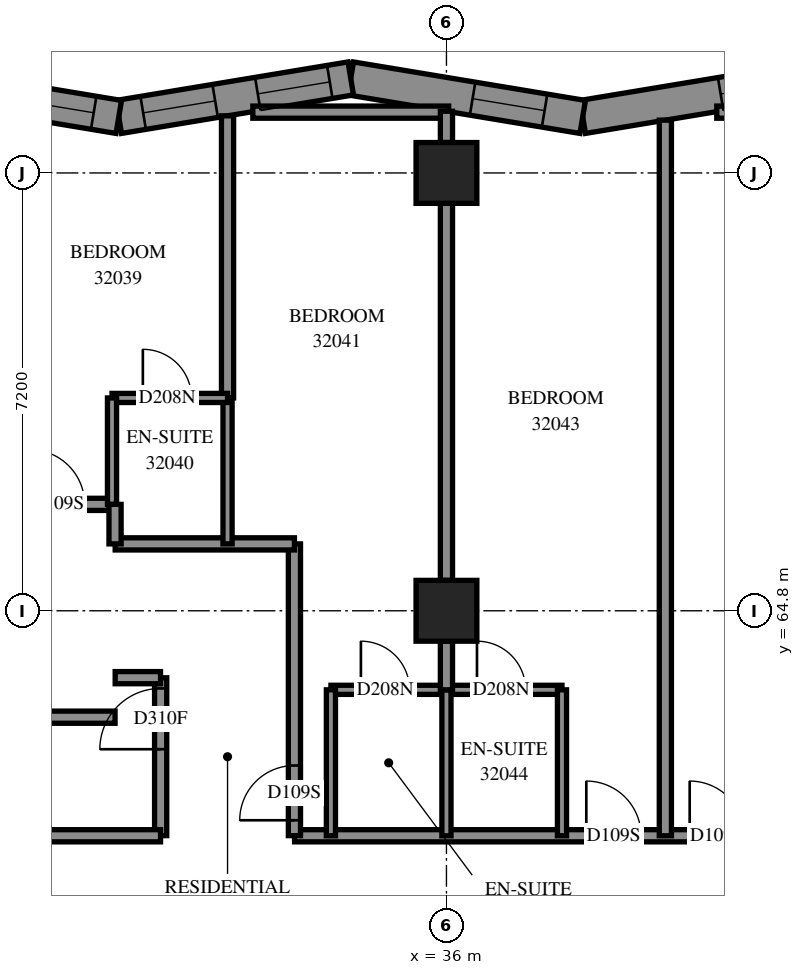
"""IFC4 building model, lengths in metres.
Left out: names, types, materials, properties, quantities, classifications, styles, units other than length and angle.
Written with IfcOpenShell. Run it as: python <this file> out.ifc"""

import sys

from ifc_helpers import new_model, si_unit, direction, frame, frame_2d, origin, origin_2d, place, context, subcontext, project, spatial, polyline, rectangle, outline, extrude, element, fill, save


model = new_model("IFC4")
c1 = context("Model", 3, precision=1e-05, world=origin(), true_north=direction((0.0, 1.0)))
c2 = subcontext(c1, "Body", "Model", "MODEL_VIEW")
j1 = project(units=[si_unit("LENGTHUNIT", "METRE"), si_unit("PLANEANGLEUNIT", "RADIAN")], contexts=[c1])
p1 = place(None, origin())
s1 = spatial("IfcSite", under=j1, at=p1, CompositionType="ELEMENT")
p2 = place(p1, origin())
s2 = spatial("IfcBuilding", under=s1, at=p2, CompositionType="ELEMENT")
p3 = place(p2, frame((0.0, 0.0, 118.6)))
s3 = spatial("IfcBuildingStorey", under=s2, at=p3, CompositionType="ELEMENT", Elevation=118.6)
for number, where, z_axis, x_axis in (
    (1, (36.0, 64.8, 0.0), (0.0, 0.0, 1.0), (1.0, 0.0, 0.0)),
    (2, (36.0, 72.0, 0.0), (0.0, 0.0, 1.0), (1.0, 0.0, 0.0)),
):
    element("IfcColumn", number, at=place(p3, frame(where, z_axis=z_axis, x_axis=x_axis)), inside=s3, PredefinedType="COLUMN", context=c2, shape_type="SweptSolid", body=[
        extrude(rectangle(XDim=1.0, YDim=1.0, at=origin_2d()), origin(), (0.0, 0.0, 1.0), 3.1),
    ])
p4 = place(p3, frame((42.056, 73.554, 0.0), z_axis=(0.0, 0.0, 1.0), x_axis=(-0.9865110911, -0.1636944324, 0.0)))
e3 = element("IfcWall", 3, at=p4, inside=s3, PredefinedType="SOLIDWALL", context=c2, shape_type="SweptSolid", body=[
    extrude(outline(polyline([(-0.046, -0.275), (3.821, -0.275), (3.913, 0.275), (0.046, 0.275), (-0.046, -0.275)])), origin(), (0.0, 0.0, 1.0), 3.1),
])
p5 = place(p4, frame((0.367, 0.0, 0.5)))
e4 = element("IfcOpeningElement", 4, at=p5, cuts=e3, PredefinedType="OPENING", context=c2, shape_type="SweptSolid", body=[
    extrude(rectangle(XDim=1.2, YDim=2.45, at=frame_2d((0.6, 1.225))), frame((0.0, 0.285, 0.0), z_axis=(0.0, -1.0, 0.0), x_axis=(1.0, 0.0, 0.0)), (0.0, 0.0, 1.0), 0.57),
])
p6 = place(p3, frame((38.241, 72.921, 0.0), z_axis=(0.0, 0.0, 1.0), x_axis=(-0.9865110911, 0.1636944324, 0.0)))
e5 = element("IfcWall", 5, at=p6, inside=s3, PredefinedType="SOLIDWALL", context=c2, shape_type="SweptSolid", body=[
    extrude(outline(polyline([(0.046, -0.275), (3.913, -0.275), (3.821, 0.275), (-0.046, 0.275), (0.046, -0.275)])), origin(), (0.0, 0.0, 1.0), 3.1),
])
p7 = place(p6, frame((0.636, 0.0, 0.5)))
e6 = element("IfcOpeningElement", 6, at=p7, cuts=e5, PredefinedType="OPENING", context=c2, shape_type="SweptSolid", body=[
    extrude(rectangle(XDim=1.2, YDim=2.45, at=frame_2d((0.6, 1.225))), frame((0.0, 0.285, 0.0), z_axis=(0.0, -1.0, 0.0), x_axis=(1.0, 0.0, 0.0)), (0.0, 0.0, 1.0), 0.57),
])
p8 = place(p3, frame((34.426, 73.554, 0.0), z_axis=(0.0, 0.0, 1.0), x_axis=(-0.9865103981, -0.1636986085, 0.0)))
e7 = element("IfcWall", 7, at=p8, inside=s3, PredefinedType="SOLIDWALL", context=c2, shape_type="SweptSolid", body=[
    extrude(outline(polyline([(-0.046, -0.275), (3.821, -0.275), (3.913, 0.275), (0.046, 0.275), (-0.046, -0.275)])), origin(), (0.0, 0.0, 1.0), 3.1),
])
p9 = place(p8, frame((0.35, 0.0, 0.5)))
e8 = element("IfcOpeningElement", 8, at=p9, cuts=e7, PredefinedType="OPENING", context=c2, shape_type="SweptSolid", body=[
    extrude(rectangle(XDim=1.2, YDim=2.45, at=frame_2d((0.6, 1.225))), frame((0.0, 0.285, 0.0), z_axis=(0.0, -1.0, 0.0), x_axis=(1.0, 0.0, 0.0)), (0.0, 0.0, 1.0), 0.57),
])
p10 = place(p8, frame((2.26, 0.0, 0.5)))
e9 = element("IfcOpeningElement", 9, at=p10, cuts=e7, PredefinedType="OPENING", context=c2, shape_type="SweptSolid", body=[
    extrude(rectangle(XDim=1.2, YDim=2.45, at=frame_2d((0.6, 1.225))), frame((0.0, 0.285, 0.0), z_axis=(0.0, -1.0, 0.0), x_axis=(1.0, 0.0, 0.0)), (0.0, 0.0, 1.0), 0.57),
])
p11 = place(p3, frame((30.611, 72.921, 0.0), z_axis=(0.0, 0.0, 1.0), x_axis=(-0.9865110911, 0.1636944324, 0.0)))
e10 = element("IfcWall", 10, at=p11, inside=s3, PredefinedType="SOLIDWALL", context=c2, shape_type="SweptSolid", body=[
    extrude(outline(polyline([(0.046, -0.275), (3.913, -0.275), (3.821, 0.275), (-0.046, 0.275), (0.046, -0.275)])), origin(), (0.0, 0.0, 1.0), 3.1),
])
p12 = place(p11, frame((0.418, 0.0, 0.5)))
e11 = element("IfcOpeningElement", 11, at=p12, cuts=e10, PredefinedType="OPENING", context=c2, shape_type="SweptSolid", body=[
    extrude(rectangle(XDim=1.2, YDim=2.45, at=frame_2d((0.6, 1.225))), frame((0.0, 0.285, 0.0), z_axis=(0.0, -1.0, 0.0), x_axis=(1.0, 0.0, 0.0)), (0.0, 0.0, 1.0), 0.57),
])
p13 = place(p11, frame((2.329, 0.0, 0.5)))
e12 = element("IfcOpeningElement", 12, at=p13, cuts=e10, PredefinedType="OPENING", context=c2, shape_type="SweptSolid", body=[
    extrude(rectangle(XDim=1.2, YDim=2.45, at=frame_2d((0.6, 1.225))), frame((0.0, 0.285, 0.0), z_axis=(0.0, -1.0, 0.0), x_axis=(1.0, 0.0, 0.0)), (0.0, 0.0, 1.0), 0.57),
])
p14 = place(p3, frame((33.502, 61.1, 0.0), z_axis=(0.0, 0.0, 1.0), x_axis=(1.0, 0.0, 0.0)))
e13 = element("IfcWall", 13, at=p14, inside=s3, PredefinedType="PARTITIONING", context=c2, shape_type="SweptSolid", body=[
    extrude(rectangle(XDim=21.198, YDim=0.2, at=frame_2d((10.599, 0.0))), origin(), (0.0, 0.0, 1.0), 3.1),
])
p15 = place(p14, frame((4.798, 0.0, 0.0)))
e14 = element("IfcOpeningElement", 14, at=p15, cuts=e13, PredefinedType="OPENING", context=c2, shape_type="SweptSolid", body=[
    extrude(rectangle(XDim=0.9, YDim=2.1, at=frame_2d((0.45, 1.05))), frame((0.0, 0.11, 0.0), z_axis=(0.0, -1.0, 0.0), x_axis=(1.0, 0.0, 0.0)), (0.0, 0.0, 1.0), 0.22),
])
p16 = place(p14, frame((6.498, 0.0, 0.0)))
e15 = element("IfcOpeningElement", 15, at=p16, cuts=e13, PredefinedType="OPENING", context=c2, shape_type="SweptSolid", body=[
    extrude(rectangle(XDim=0.9, YDim=2.1, at=frame_2d((0.45, 1.05))), frame((0.0, 0.11, 0.0), z_axis=(0.0, -1.0, 0.0), x_axis=(1.0, 0.0, 0.0)), (0.0, 0.0, 1.0), 0.22),
])
p17 = place(p14, frame((11.998, 0.0, 0.0)))
e16 = element("IfcOpeningElement", 16, at=p17, cuts=e13, PredefinedType="OPENING", context=c2, shape_type="SweptSolid", body=[
    extrude(rectangle(XDim=0.9, YDim=2.1, at=frame_2d((0.45, 1.05))), frame((0.0, 0.11, 0.0), z_axis=(0.0, -1.0, 0.0), x_axis=(1.0, 0.0, 0.0)), (0.0, 0.0, 1.0), 0.22),
])
p18 = place(p14, frame((13.698, 0.0, 0.0)))
e17 = element("IfcOpeningElement", 17, at=p18, cuts=e13, PredefinedType="OPENING", context=c2, shape_type="SweptSolid", body=[
    extrude(rectangle(XDim=0.9, YDim=2.1, at=frame_2d((0.45, 1.05))), frame((0.0, 0.11, 0.0), z_axis=(0.0, -1.0, 0.0), x_axis=(1.0, 0.0, 0.0)), (0.0, 0.0, 1.0), 0.22),
])
p19 = place(p14, frame((19.198, 0.0, 0.0)))
e18 = element("IfcOpeningElement", 18, at=p19, cuts=e13, PredefinedType="OPENING", context=c2, shape_type="SweptSolid", body=[
    extrude(rectangle(XDim=0.9, YDim=2.1, at=frame_2d((0.45, 1.05))), frame((0.0, 0.11, 0.0), z_axis=(0.0, -1.0, 0.0), x_axis=(1.0, 0.0, 0.0)), (0.0, 0.0, 1.0), 0.22),
])
p20 = place(p3, frame((39.6, 61.1, 0.0), z_axis=(0.0, 0.0, 1.0), x_axis=(0.0, 1.0, 0.0)))
e19 = element("IfcWall", 19, at=p20, inside=s3, PredefinedType="PARTITIONING", context=c2, shape_type="SweptSolid", body=[
    extrude(rectangle(XDim=11.768, YDim=0.2, at=frame_2d((5.884, 0.0))), origin(), (0.0, 0.0, 1.0), 3.1),
])
p21 = place(p3, frame((36.0, 65.3, 0.0), z_axis=(0.0, 0.0, 1.0), x_axis=(0.0, 1.0, 0.0)))
e20 = element("IfcWall", 20, at=p21, inside=s3, PredefinedType="PARTITIONING", context=c2, shape_type="SweptSolid", body=[
    extrude(rectangle(XDim=6.2, YDim=0.2, at=frame_2d((3.1, 0.0))), origin(), (0.0, 0.0, 1.0), 3.1),
])
p22 = place(p3, frame((33.5, 61.102, 0.0), z_axis=(0.0, 0.0, 1.0), x_axis=(0.0, 1.0, 0.0)))
e21 = element("IfcWall", 21, at=p22, inside=s3, PredefinedType="PARTITIONING", context=c2, shape_type="SweptSolid", body=[
    extrude(rectangle(XDim=4.798, YDim=0.2, at=frame_2d((2.399, 0.0))), origin(), (0.0, 0.0, 1.0), 3.1),
])
p23 = place(p22, frame((0.253, 0.0, 0.0)))
e22 = element("IfcOpeningElement", 22, at=p23, cuts=e21, PredefinedType="OPENING", context=c2, shape_type="SweptSolid", body=[
    extrude(rectangle(XDim=0.9, YDim=2.1, at=frame_2d((0.45, 1.05))), frame((0.0, 0.11, 0.0), z_axis=(0.0, -1.0, 0.0), x_axis=(1.0, 0.0, 0.0)), (0.0, 0.0, 1.0), 0.22),
])
p24 = place(p3, frame((32.4, 68.3, 0.0), z_axis=(0.0, 0.0, 1.0), x_axis=(0.0, 1.0, 0.0)))
e23 = element("IfcWall", 23, at=p24, inside=s3, PredefinedType="PARTITIONING", context=c2, shape_type="SweptSolid", body=[
    extrude(rectangle(XDim=4.639, YDim=0.2, at=frame_2d((2.32, 0.0))), origin(), (0.0, 0.0, 1.0), 3.1),
])
p25 = place(p3, frame((34.1, 63.5, 0.0), z_axis=(0.0, 0.0, 1.0), x_axis=(1.0, 0.0, 0.0)))
e24 = element("IfcWall", 24, at=p25, inside=s3, PredefinedType="PARTITIONING", context=c2, shape_type="SweptSolid", body=[
    extrude(rectangle(XDim=3.8, YDim=0.15, at=frame_2d((1.9, 0.0))), origin(), (0.0, 0.0, 1.0), 3.1),
])
p26 = place(p25, frame((0.493, 0.0, 0.0)))
e25 = element("IfcOpeningElement", 25, at=p26, cuts=e24, PredefinedType="OPENING", context=c2, shape_type="SweptSolid", body=[
    extrude(rectangle(XDim=0.8, YDim=2.1, at=frame_2d((0.4, 1.05))), frame((0.0, 0.085, 0.0), z_axis=(0.0, -1.0, 0.0), x_axis=(1.0, 0.0, 0.0)), (0.0, 0.0, 1.0), 0.17),
])
p27 = place(p25, frame((2.402, 0.0, 0.0)))
e26 = element("IfcOpeningElement", 26, at=p27, cuts=e24, PredefinedType="OPENING", context=c2, shape_type="SweptSolid", body=[
    extrude(rectangle(XDim=0.8, YDim=2.1, at=frame_2d((0.4, 1.05))), frame((0.0, 0.085, 0.0), z_axis=(0.0, -1.0, 0.0), x_axis=(1.0, 0.0, 0.0)), (0.0, 0.0, 1.0), 0.17),
])
p28 = place(p3, frame((27.1, 66.55, 0.0), z_axis=(0.0, 0.0, 1.0), x_axis=(1.0, 0.0, 0.0)))
e27 = element("IfcWall", 27, at=p28, inside=s3, PredefinedType="PARTITIONING", context=c2, shape_type="SweptSolid", body=[
    extrude(rectangle(XDim=3.4, YDim=0.2, at=frame_2d((1.7, 0.0))), origin(), (0.0, 0.0, 1.0), 3.1),
])
p29 = place(p28, frame((0.4, 0.0, 0.0)))
e28 = element("IfcOpeningElement", 28, at=p29, cuts=e27, PredefinedType="OPENING", context=c2, shape_type="SweptSolid", body=[
    extrude(rectangle(XDim=0.9, YDim=2.1, at=frame_2d((0.45, 1.05))), frame((0.0, 0.11, 0.0), z_axis=(0.0, -1.0, 0.0), x_axis=(1.0, 0.0, 0.0)), (0.0, 0.0, 1.0), 0.22),
])
p30 = place(p28, frame((2.05, 0.0, 0.0)))
e29 = element("IfcOpeningElement", 29, at=p30, cuts=e27, PredefinedType="OPENING", context=c2, shape_type="SweptSolid", body=[
    extrude(rectangle(XDim=0.9, YDim=2.1, at=frame_2d((0.45, 1.05))), frame((0.0, 0.11, 0.0), z_axis=(0.0, -1.0, 0.0), x_axis=(1.0, 0.0, 0.0)), (0.0, 0.0, 1.0), 0.22),
])
p31 = place(p3, frame((40.446, 73.0, 0.0), z_axis=(0.0, 0.0, 1.0), x_axis=(1.0, 0.0, 0.0)))
e30 = element("IfcWall", 30, at=p31, inside=s3, PredefinedType="PARTITIONING", context=c2, shape_type="SweptSolid", body=[
    extrude(rectangle(XDim=3.22, YDim=0.2, at=frame_2d((1.61, 0.0))), origin(), (0.0, 0.0, 1.0), 3.1),
])
p32 = place(p3, frame((32.816, 73.0, 0.0), z_axis=(0.0, 0.0, 1.0), x_axis=(1.0, 0.0, 0.0)))
e31 = element("IfcWall", 31, at=p32, inside=s3, PredefinedType="PARTITIONING", context=c2, shape_type="SweptSolid", body=[
    extrude(rectangle(XDim=3.22, YDim=0.2, at=frame_2d((1.61, 0.0))), origin(), (0.0, 0.0, 1.0), 3.1),
])
p33 = place(p3, frame((30.552, 65.9, 0.0), z_axis=(0.0, 0.0, 1.0), x_axis=(1.0, 0.0, 0.0)))
e32 = element("IfcWall", 32, at=p33, inside=s3, PredefinedType="PARTITIONING", context=c2, shape_type="SweptSolid", body=[
    extrude(rectangle(XDim=2.948, YDim=0.2, at=frame_2d((1.474, 0.0))), origin(), (0.0, 0.0, 1.0), 3.1),
])
p34 = place(p3, frame((31.3, 61.102, 0.0), z_axis=(0.0, 0.0, 1.0), x_axis=(0.0, 1.0, 0.0)))
e33 = element("IfcWall", 33, at=p34, inside=s3, PredefinedType="PARTITIONING", context=c2, shape_type="SweptSolid", body=[
    extrude(rectangle(XDim=2.596, YDim=0.2, at=frame_2d((1.298, 0.0))), origin(), (0.0, 0.0, 1.0), 3.1),
])
p35 = place(p34, frame((1.421, 0.0, 0.0)))
e34 = element("IfcOpeningElement", 34, at=p35, cuts=e33, PredefinedType="OPENING", context=c2, shape_type="SweptSolid", body=[
    extrude(rectangle(XDim=1.0, YDim=2.1, at=frame_2d((0.5, 1.05))), frame((0.0, 0.11, 0.0), z_axis=(0.0, -1.0, 0.0), x_axis=(1.0, 0.0, 0.0)), (0.0, 0.0, 1.0), 0.22),
])
p36 = place(p3, frame((28.802, 61.1, 0.0), z_axis=(0.0, 0.0, 1.0), x_axis=(1.0, 0.0, 0.0)))
e35 = element("IfcWall", 35, at=p36, inside=s3, PredefinedType="PARTITIONING", context=c2, shape_type="SweptSolid", body=[
    extrude(rectangle(XDim=2.496, YDim=0.2, at=frame_2d((1.248, 0.0))), origin(), (0.0, 0.0, 1.0), 3.1),
])
for number, where, z_axis, x_axis in (
    (36, (34.1, 61.1, 0.0), (0.0, 0.0, 1.0), (0.0, 1.0, 0.0)),
    (37, (36.0, 61.1, 0.0), (0.0, 0.0, 1.0), (0.0, 1.0, 0.0)),
    (38, (37.9, 61.1, 0.0), (0.0, 0.0, 1.0), (0.0, 1.0, 0.0)),
    (39, (32.4, 65.9, 0.0), (0.0, 0.0, 1.0), (0.0, 1.0, 0.0)),
):
    element("IfcWall", number, at=place(p3, frame(where, z_axis=z_axis, x_axis=x_axis)), inside=s3, PredefinedType="PARTITIONING", context=c2, shape_type="SweptSolid", body=[
        extrude(rectangle(XDim=2.4, YDim=0.15, at=frame_2d((1.2, 0.0))), origin(), (0.0, 0.0, 1.0), 3.1),
    ])
p37 = place(p3, frame((28.15, 63.05, 0.0), z_axis=(0.0, 0.0, 1.0), x_axis=(1.0, 0.0, 0.0)))
e40 = element("IfcWall", 40, at=p37, inside=s3, PredefinedType="PARTITIONING", context=c2, shape_type="SweptSolid", body=[
    extrude(rectangle(XDim=2.4, YDim=0.2, at=frame_2d((1.2, 0.0))), origin(), (0.0, 0.0, 1.0), 3.1),
])
p38 = place(p3, frame((30.5, 68.3, 0.0), z_axis=(0.0, 0.0, 1.0), x_axis=(1.0, 0.0, 0.0)))
e41 = element("IfcWall", 41, at=p38, inside=s3, PredefinedType="PARTITIONING", context=c2, shape_type="SweptSolid", body=[
    extrude(rectangle(XDim=1.9, YDim=0.15, at=frame_2d((0.95, 0.0))), origin(), (0.0, 0.0, 1.0), 3.1),
])
p39 = place(p38, frame((0.507, 0.0, 0.0)))
e42 = element("IfcOpeningElement", 42, at=p39, cuts=e41, PredefinedType="OPENING", context=c2, shape_type="SweptSolid", body=[
    extrude(rectangle(XDim=0.8, YDim=2.1, at=frame_2d((0.4, 1.05))), frame((0.0, 0.085, 0.0), z_axis=(0.0, -1.0, 0.0), x_axis=(1.0, 0.0, 0.0)), (0.0, 0.0, 1.0), 0.17),
])
p40 = place(p3, frame((30.5, 66.55, 0.0), z_axis=(0.0, 0.0, 1.0), x_axis=(0.0, 1.0, 0.0)))
e43 = element("IfcWall", 43, at=p40, inside=s3, PredefinedType="PARTITIONING", context=c2, shape_type="SweptSolid", body=[
    extrude(rectangle(XDim=1.75, YDim=0.15, at=frame_2d((0.875, 0.0))), origin(), (0.0, 0.0, 1.0), 3.1),
])
p41 = place(p3, frame((36.0, 63.5, 0.0), z_axis=(0.0, 0.0, 1.0), x_axis=(0.0, 1.0, 0.0)))
e44 = element("IfcWall", 44, at=p41, inside=s3, PredefinedType="PARTITIONING", context=c2, shape_type="SweptSolid", body=[
    extrude(rectangle(XDim=0.8, YDim=0.2, at=frame_2d((0.4, 0.0))), origin(), (0.0, 0.0, 1.0), 3.1),
])
p42 = place(p3, frame((30.552, 63.7, 0.0), z_axis=(0.0, 0.0, 1.0), x_axis=(1.0, 0.0, 0.0)))
e45 = element("IfcWall", 45, at=p42, inside=s3, PredefinedType="PARTITIONING", context=c2, shape_type="SweptSolid", body=[
    extrude(rectangle(XDim=0.746, YDim=0.2, at=frame_2d((0.373, 0.0))), origin(), (0.0, 0.0, 1.0), 3.1),
])
p43 = place(p3, frame((30.55, 65.9, 0.0), z_axis=(0.0, 0.0, 1.0), x_axis=(0.0, 1.0, 0.0)))
e46 = element("IfcWall", 46, at=p43, inside=s3, PredefinedType="PARTITIONING", context=c2, shape_type="SweptSolid", body=[
    extrude(rectangle(XDim=0.65, YDim=0.2, at=frame_2d((0.325, 0.0))), origin(), (0.0, 0.0, 1.0), 3.1),
])
p44 = place(p3, frame((36.0, 72.5, 0.0), z_axis=(0.0, 0.0, 1.0), x_axis=(0.0, 1.0, 0.0)))
e47 = element("IfcWall", 47, at=p44, inside=s3, PredefinedType="PARTITIONING", context=c2, shape_type="SweptSolid", body=[
    extrude(rectangle(XDim=0.514, YDim=0.2, at=frame_2d((0.257, 0.0))), origin(), (0.0, 0.0, 1.0), 3.1),
])
p45 = place(p5, origin())
e48 = element("IfcWindow", 48, at=p45, inside=s3, PartitioningType="SINGLE_PANEL", PredefinedType="WINDOW", context=c2, shape_type="SweptSolid", body=[
    extrude(rectangle(XDim=1.2, YDim=2.45, at=frame_2d((0.6, 1.225))), frame((0.0, 0.155, 0.0), z_axis=(0.0, -1.0, 0.0), x_axis=(1.0, 0.0, 0.0)), (0.0, 0.0, 1.0), 0.06),
])
fill(e4, e48)
p46 = place(p7, origin())
e49 = element("IfcWindow", 49, at=p46, inside=s3, PartitioningType="SINGLE_PANEL", PredefinedType="WINDOW", context=c2, shape_type="SweptSolid", body=[
    extrude(rectangle(XDim=1.2, YDim=2.45, at=frame_2d((0.6, 1.225))), frame((0.0, 0.155, 0.0), z_axis=(0.0, -1.0, 0.0), x_axis=(1.0, 0.0, 0.0)), (0.0, 0.0, 1.0), 0.06),
])
fill(e6, e49)
p47 = place(p9, origin())
e50 = element("IfcWindow", 50, at=p47, inside=s3, PartitioningType="SINGLE_PANEL", PredefinedType="WINDOW", context=c2, shape_type="SweptSolid", body=[
    extrude(rectangle(XDim=1.2, YDim=2.45, at=frame_2d((0.6, 1.225))), frame((0.0, 0.155, 0.0), z_axis=(0.0, -1.0, 0.0), x_axis=(1.0, 0.0, 0.0)), (0.0, 0.0, 1.0), 0.06),
])
fill(e8, e50)
p48 = place(p10, origin())
e51 = element("IfcWindow", 51, at=p48, inside=s3, PartitioningType="SINGLE_PANEL", PredefinedType="WINDOW", context=c2, shape_type="SweptSolid", body=[
    extrude(rectangle(XDim=1.2, YDim=2.45, at=frame_2d((0.6, 1.225))), frame((0.0, 0.155, 0.0), z_axis=(0.0, -1.0, 0.0), x_axis=(1.0, 0.0, 0.0)), (0.0, 0.0, 1.0), 0.06),
])
fill(e9, e51)
p49 = place(p12, origin())
e52 = element("IfcWindow", 52, at=p49, inside=s3, PartitioningType="SINGLE_PANEL", PredefinedType="WINDOW", context=c2, shape_type="SweptSolid", body=[
    extrude(rectangle(XDim=1.2, YDim=2.45, at=frame_2d((0.6, 1.225))), frame((0.0, 0.155, 0.0), z_axis=(0.0, -1.0, 0.0), x_axis=(1.0, 0.0, 0.0)), (0.0, 0.0, 1.0), 0.06),
])
fill(e11, e52)
p50 = place(p35, origin())
e53 = element("IfcDoor", 53, at=p50, inside=s3, OperationType="SINGLE_SWING_LEFT", PredefinedType="DOOR", context=c2, shape_type="SweptSolid", body=[
    extrude(rectangle(XDim=1.0, YDim=2.1, at=frame_2d((0.5, 1.05))), frame((0.0, 0.025, 0.0), z_axis=(0.0, -1.0, 0.0), x_axis=(1.0, 0.0, 0.0)), (0.0, 0.0, 1.0), 0.05),
])
fill(e34, e53)
p51 = place(p30, origin())
e54 = element("IfcDoor", 54, at=p51, inside=s3, OperationType="SINGLE_SWING_RIGHT", PredefinedType="DOOR", context=c2, shape_type="SweptSolid", body=[
    extrude(rectangle(XDim=0.9, YDim=2.1, at=frame_2d((0.45, 1.05))), frame((0.0, 0.025, 0.0), z_axis=(0.0, -1.0, 0.0), x_axis=(1.0, 0.0, 0.0)), (0.0, 0.0, 1.0), 0.05),
])
fill(e29, e54)
p52 = place(p39, origin())
e55 = element("IfcDoor", 55, at=p52, inside=s3, OperationType="SINGLE_SWING_RIGHT", PredefinedType="DOOR", context=c2, shape_type="SweptSolid", body=[
    extrude(rectangle(XDim=0.8, YDim=2.1, at=frame_2d((0.4, 1.05))), frame((0.0, 0.025, 0.0), z_axis=(0.0, -1.0, 0.0), x_axis=(1.0, 0.0, 0.0)), (0.0, 0.0, 1.0), 0.05),
])
fill(e42, e55)
p53 = place(p23, origin())
e56 = element("IfcDoor", 56, at=p53, inside=s3, OperationType="SINGLE_SWING_LEFT", PredefinedType="DOOR", context=c2, shape_type="SweptSolid", body=[
    extrude(rectangle(XDim=0.9, YDim=2.1, at=frame_2d((0.45, 1.05))), frame((0.0, 0.025, 0.0), z_axis=(0.0, -1.0, 0.0), x_axis=(1.0, 0.0, 0.0)), (0.0, 0.0, 1.0), 0.05),
])
fill(e22, e56)
p54 = place(p26, origin())
e57 = element("IfcDoor", 57, at=p54, inside=s3, OperationType="SINGLE_SWING_RIGHT", PredefinedType="DOOR", context=c2, shape_type="SweptSolid", body=[
    extrude(rectangle(XDim=0.8, YDim=2.1, at=frame_2d((0.4, 1.05))), frame((0.0, 0.025, 0.0), z_axis=(0.0, -1.0, 0.0), x_axis=(1.0, 0.0, 0.0)), (0.0, 0.0, 1.0), 0.05),
])
fill(e25, e57)
p55 = place(p15, origin())
e58 = element("IfcDoor", 58, at=p55, inside=s3, OperationType="SINGLE_SWING_RIGHT", PredefinedType="DOOR", context=c2, shape_type="SweptSolid", body=[
    extrude(rectangle(XDim=0.9, YDim=2.1, at=frame_2d((0.45, 1.05))), frame((0.0, 0.025, 0.0), z_axis=(0.0, -1.0, 0.0), x_axis=(1.0, 0.0, 0.0)), (0.0, 0.0, 1.0), 0.05),
])
fill(e14, e58)
p56 = place(p27, origin())
e59 = element("IfcDoor", 59, at=p56, inside=s3, OperationType="SINGLE_SWING_RIGHT", PredefinedType="DOOR", context=c2, shape_type="SweptSolid", body=[
    extrude(rectangle(XDim=0.8, YDim=2.1, at=frame_2d((0.4, 1.05))), frame((0.0, 0.025, 0.0), z_axis=(0.0, -1.0, 0.0), x_axis=(1.0, 0.0, 0.0)), (0.0, 0.0, 1.0), 0.05),
])
fill(e26, e59)
p57 = place(p16, origin())
e60 = element("IfcDoor", 60, at=p57, inside=s3, OperationType="SINGLE_SWING_LEFT", PredefinedType="DOOR", context=c2, shape_type="SweptSolid", body=[
    extrude(rectangle(XDim=0.9, YDim=2.1, at=frame_2d((0.45, 1.05))), frame((0.0, 0.025, 0.0), z_axis=(0.0, -1.0, 0.0), x_axis=(1.0, 0.0, 0.0)), (0.0, 0.0, 1.0), 0.05),
])
fill(e15, e60)
save(model, sys.argv[1])
